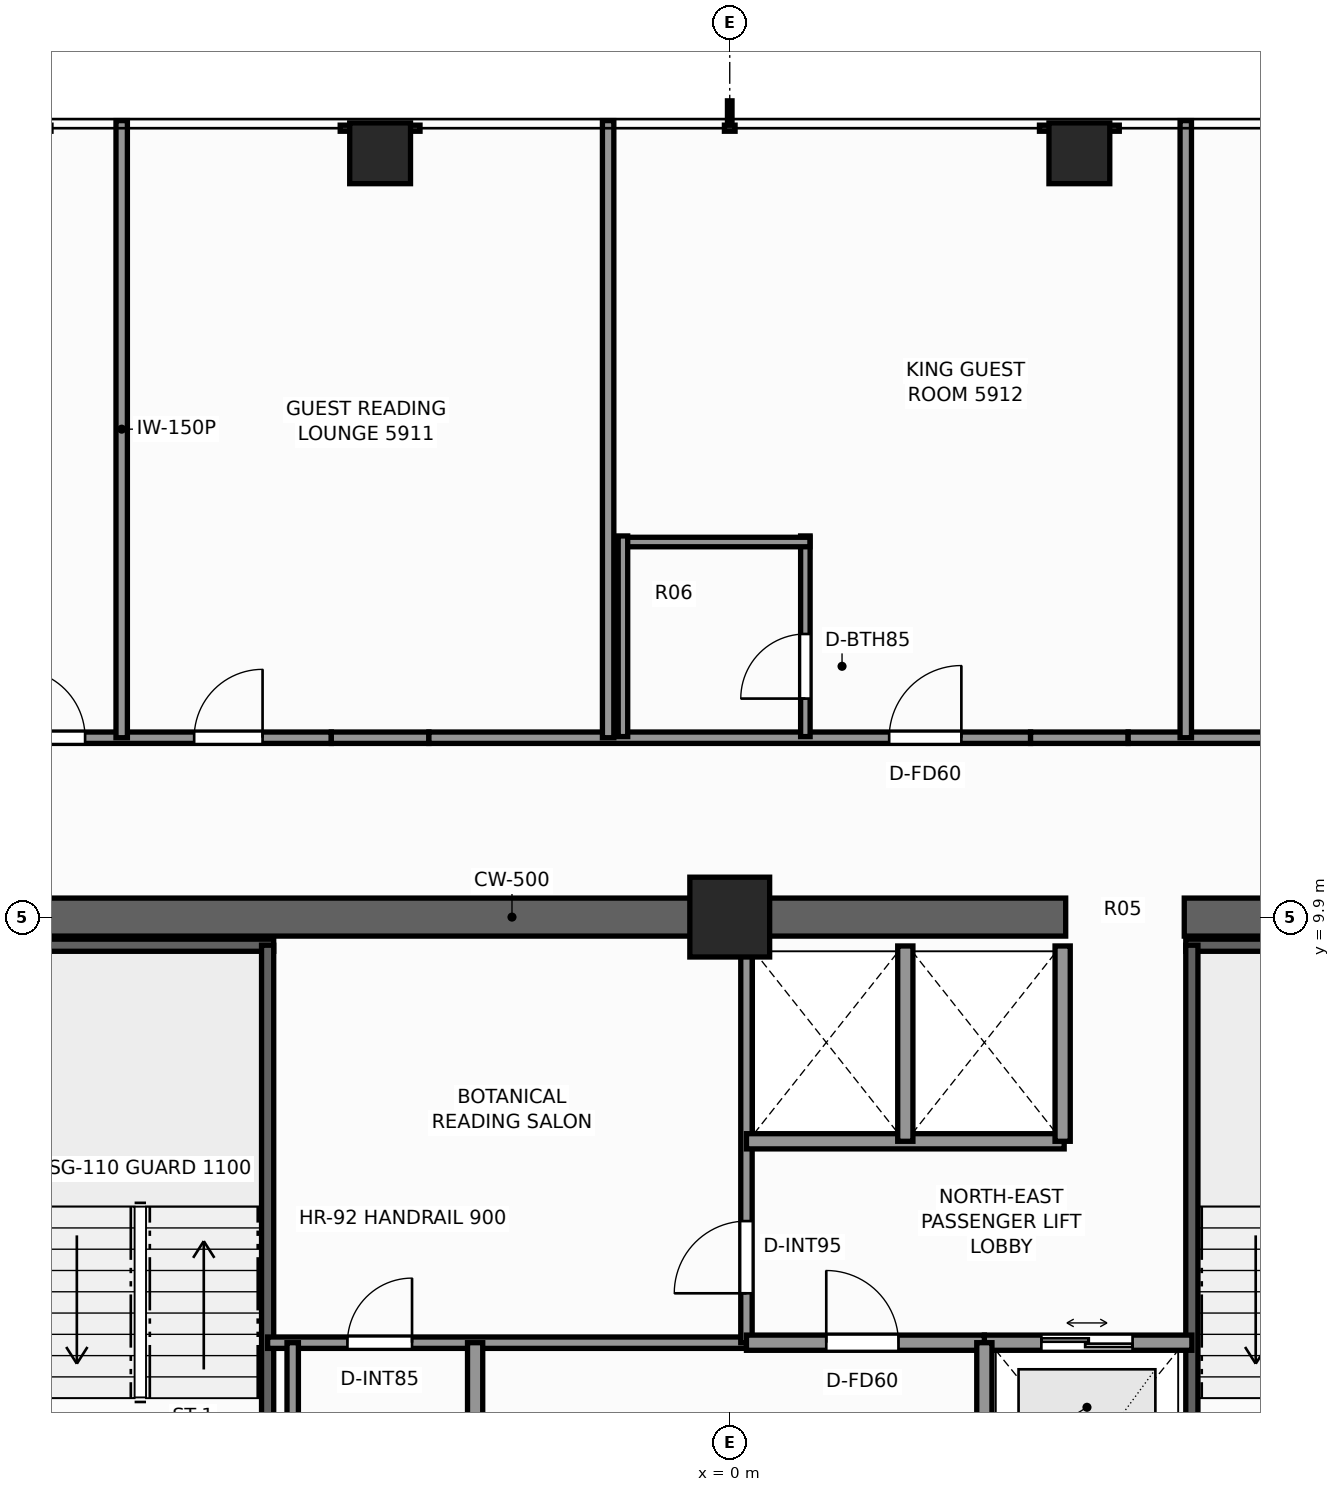
"""IFC4 building model, lengths in metres.
Left out: names, types, materials, properties, quantities, classifications, styles, units other than length and angle.
Written with IfcOpenShell. Run it as: python <this file> out.ifc"""

import sys

from ifc_helpers import new_model, si_unit, direction, frame, frame_2d, origin, origin_2d, place, context, subcontext, project, spatial, rectangle, extrude, element, fill, save


model = new_model("IFC4")
c1 = context("Model", 3, precision=1e-05, world=origin(), true_north=direction((0.0, 1.0)))
c2 = subcontext(c1, "Body", "Model", "MODEL_VIEW")
j1 = project(units=[si_unit("LENGTHUNIT", "METRE"), si_unit("PLANEANGLEUNIT", "RADIAN")], contexts=[c1])
p1 = place(None, origin())
s1 = spatial("IfcSite", under=j1, at=p1, CompositionType="ELEMENT")
p2 = place(p1, origin())
s2 = spatial("IfcBuilding", under=s1, at=p2, CompositionType="ELEMENT")
p3 = place(p2, frame((0.0, 0.0, 203.1)))
s3 = spatial("IfcBuildingStorey", under=s2, at=p3, CompositionType="ELEMENT", Elevation=203.1)
p4 = place(p3, frame((-10.15, 9.9, 0.0), z_axis=(0.0, 0.0, 1.0), x_axis=(1.0, 0.0, 0.0)))
e1 = element("IfcWall", 1, at=p4, inside=s3, PredefinedType="SHEAR", context=c2, shape_type="SweptSolid", body=[
    extrude(rectangle(XDim=14.57, YDim=0.5, at=frame_2d((7.285, 0.0))), origin(), (0.0, 0.0, 1.0), 3.3),
])
p5 = place(p3, frame((5.98, 9.9, 0.0), z_axis=(0.0, 0.0, 1.0), x_axis=(1.0, 0.0, 0.0)))
e2 = element("IfcWall", 2, at=p5, inside=s3, PredefinedType="SHEAR", context=c2, shape_type="SweptSolid", body=[
    extrude(rectangle(XDim=4.17, YDim=0.5, at=frame_2d((2.085, 0.0))), origin(), (0.0, 0.0, 1.0), 3.3),
])
p6 = place(p3, frame((0.0, 9.9, 0.0), z_axis=(0.0, 0.0, 1.0), x_axis=(1.0, 0.0, 0.0)))
e3 = element("IfcColumn", 3, at=p6, inside=s3, PredefinedType="COLUMN", context=c2, shape_type="SweptSolid", body=[
    extrude(rectangle(XDim=1.05, YDim=1.05, at=origin_2d()), origin(), (0.0, 0.0, 1.0), 3.3),
])
for number, where, z_axis, x_axis in (
    (4, (-4.6, 19.95, 0.0), (0.0, 0.0, 1.0), (1.0, 0.0, 0.0)),
    (5, (4.6, 19.95, 0.0), (0.0, 0.0, 1.0), (1.0, 0.0, 0.0)),
):
    element("IfcColumn", number, at=place(p3, frame(where, z_axis=z_axis, x_axis=x_axis)), inside=s3, PredefinedType="COLUMN", context=c2, shape_type="SweptSolid", body=[
        extrude(rectangle(XDim=0.8, YDim=0.8, at=origin_2d()), origin(), (0.0, 0.0, 1.0), 3.3),
    ])
p7 = place(p3, frame((-9.52, 9.53, 0.0), z_axis=(0.0, 0.0, 1.0), x_axis=(1.0, 0.0, 0.0)))
e6 = element("IfcWall", 6, at=p7, inside=s3, PredefinedType="SHEAR", context=c2, shape_type="SweptSolid", body=[
    extrude(rectangle(XDim=3.52, YDim=0.16, at=frame_2d((1.76, 0.0))), origin(), (0.0, 0.0, 1.0), 3.3),
])
p8 = place(p3, frame((-6.08, 1.97, 0.0), z_axis=(0.0, 0.0, 1.0), x_axis=(0.0, 1.0, 0.0)))
e7 = element("IfcWall", 7, at=p8, inside=s3, PredefinedType="SHEAR", context=c2, shape_type="SweptSolid", body=[
    extrude(rectangle(XDim=7.56, YDim=0.16, at=frame_2d((3.78, 0.0))), origin(), (0.0, 0.0, 1.0), 3.3),
])
p9 = place(p3, frame((6.0, 9.53, 0.0), z_axis=(0.0, 0.0, 1.0), x_axis=(1.0, 0.0, 0.0)))
e8 = element("IfcWall", 8, at=p9, inside=s3, PredefinedType="SHEAR", context=c2, shape_type="SweptSolid", body=[
    extrude(rectangle(XDim=3.52, YDim=0.16, at=frame_2d((1.76, 0.0))), origin(), (0.0, 0.0, 1.0), 3.3),
])
p10 = place(p3, frame((6.08, 1.97, 0.0), z_axis=(0.0, 0.0, 1.0), x_axis=(0.0, 1.0, 0.0)))
e9 = element("IfcWall", 9, at=p10, inside=s3, PredefinedType="SHEAR", context=c2, shape_type="SweptSolid", body=[
    extrude(rectangle(XDim=7.56, YDim=0.16, at=frame_2d((3.78, 0.0))), origin(), (0.0, 0.0, 1.0), 3.3),
])
p11 = place(p3, frame((3.35, 4.3, 0.0), z_axis=(0.0, 0.0, 1.0), x_axis=(1.0, 0.0, 0.0)))
e10 = element("IfcWall", 10, at=p11, inside=s3, PredefinedType="SOLIDWALL", context=c2, shape_type="SweptSolid", body=[
    extrude(rectangle(XDim=2.73, YDim=0.2, at=frame_2d((1.365, 0.0))), origin(), (0.0, 0.0, 1.0), 3.08),
])
p12 = place(p11, frame((0.75, 0.0, 0.0)))
e11 = element("IfcOpeningElement", 11, at=p12, cuts=e10, PredefinedType="OPENING", context=c2, shape_type="SweptSolid", body=[
    extrude(rectangle(XDim=1.2, YDim=2.25, at=frame_2d((0.6, 1.125))), frame((0.0, 0.11, 0.0), z_axis=(0.0, -1.0, 0.0), x_axis=(1.0, 0.0, 0.0)), (0.0, 0.0, 1.0), 0.22),
])
p13 = place(p3, frame((-6.08, 4.3, 0.0), z_axis=(0.0, 0.0, 1.0), x_axis=(1.0, 0.0, 0.0)))
e12 = element("IfcWall", 12, at=p13, inside=s3, PredefinedType="PARTITIONING", context=c2, shape_type="SweptSolid", body=[
    extrude(rectangle(XDim=6.3, YDim=0.15, at=frame_2d((3.15, 0.0))), origin(), (0.0, 0.0, 1.0), 3.08),
])
p14 = place(p13, frame((1.05, 0.0, 0.0)))
e13 = element("IfcOpeningElement", 13, at=p14, cuts=e12, PredefinedType="OPENING", context=c2, shape_type="SweptSolid", body=[
    extrude(rectangle(XDim=0.85, YDim=2.03, at=frame_2d((0.425, 1.015))), frame((0.0, 0.085, 0.0), z_axis=(0.0, -1.0, 0.0), x_axis=(1.0, 0.0, 0.0)), (0.0, 0.0, 1.0), 0.17),
])
p15 = place(p3, frame((0.22, 4.3, 0.0), z_axis=(0.0, 0.0, 1.0), x_axis=(0.0, 1.0, 0.0)))
e14 = element("IfcWall", 14, at=p15, inside=s3, PredefinedType="PARTITIONING", context=c2, shape_type="SweptSolid", body=[
    extrude(rectangle(XDim=5.22, YDim=0.15, at=frame_2d((2.61, 0.0))), origin(), (0.0, 0.0, 1.0), 3.08),
])
p16 = place(p15, frame((0.65, 0.0, 0.0)))
e15 = element("IfcOpeningElement", 15, at=p16, cuts=e14, PredefinedType="OPENING", context=c2, shape_type="SweptSolid", body=[
    extrude(rectangle(XDim=0.95, YDim=2.06, at=frame_2d((0.475, 1.03))), frame((0.0, 0.085, 0.0), z_axis=(0.0, -1.0, 0.0), x_axis=(1.0, 0.0, 0.0)), (0.0, 0.0, 1.0), 0.17),
])
p17 = place(p3, frame((0.22, 6.95, 0.0), z_axis=(0.0, 0.0, 1.0), x_axis=(1.0, 0.0, 0.0)))
e16 = element("IfcWall", 16, at=p17, inside=s3, PredefinedType="SOLIDWALL", context=c2, shape_type="SweptSolid", body=[
    extrude(rectangle(XDim=4.18, YDim=0.2, at=frame_2d((2.09, 0.0))), origin(), (0.0, 0.0, 1.0), 3.08),
])
for number, where, z_axis, x_axis in (
    (17, (4.38, 6.95, 0.0), (0.0, 0.0, 1.0), (0.0, 1.0, 0.0)),
    (18, (2.31, 6.95, 0.0), (0.0, 0.0, 1.0), (0.0, 1.0, 0.0)),
):
    element("IfcWall", number, at=place(p3, frame(where, z_axis=z_axis, x_axis=x_axis)), inside=s3, PredefinedType="SOLIDWALL", context=c2, shape_type="SweptSolid", body=[
        extrude(rectangle(XDim=2.57, YDim=0.2, at=frame_2d((1.285, 0.0))), origin(), (0.0, 0.0, 1.0), 3.08),
    ])
p18 = place(p3, frame((0.22, 4.3, 0.0), z_axis=(0.0, 0.0, 1.0), x_axis=(1.0, 0.0, 0.0)))
e19 = element("IfcWall", 19, at=p18, inside=s3, PredefinedType="SOLIDWALL", context=c2, shape_type="SweptSolid", body=[
    extrude(rectangle(XDim=3.13, YDim=0.2, at=frame_2d((1.565, 0.0))), origin(), (0.0, 0.0, 1.0), 3.08),
])
p19 = place(p18, frame((1.05, 0.0, 0.0)))
e20 = element("IfcOpeningElement", 20, at=p19, cuts=e19, PredefinedType="OPENING", context=c2, shape_type="SweptSolid", body=[
    extrude(rectangle(XDim=0.95, YDim=2.06, at=frame_2d((0.475, 1.03))), frame((0.0, 0.11, 0.0), z_axis=(0.0, -1.0, 0.0), x_axis=(1.0, 0.0, 0.0)), (0.0, 0.0, 1.0), 0.22),
])
for number, where, z_axis, x_axis in (
    (21, (-3.35, 1.1, 0.0), (0.0, 0.0, 1.0), (0.0, 1.0, 0.0)),
    (22, (3.35, 1.1, 0.0), (0.0, 0.0, 1.0), (0.0, 1.0, 0.0)),
):
    element("IfcWall", number, at=place(p3, frame(where, z_axis=z_axis, x_axis=x_axis)), inside=s3, PredefinedType="SOLIDWALL", context=c2, shape_type="SweptSolid", body=[
        extrude(rectangle(XDim=3.2, YDim=0.2, at=frame_2d((1.6, 0.0))), origin(), (0.0, 0.0, 1.0), 3.08),
    ])
p20 = place(p3, frame((-5.75, 1.97, 0.0), z_axis=(0.0, 0.0, 1.0), x_axis=(0.0, 1.0, 0.0)))
e23 = element("IfcWall", 23, at=p20, inside=s3, PredefinedType="PARTITIONING", context=c2, shape_type="SweptSolid", body=[
    extrude(rectangle(XDim=2.33, YDim=0.15, at=frame_2d((1.165, 0.0))), origin(), (0.0, 0.0, 1.0), 3.08),
])
p21 = place(p3, frame((-10.014, 12.26, 0.0), z_axis=(0.0, 0.0, 1.0), x_axis=(1.0, 0.0, 0.0)))
e24 = element("IfcWall", 24, at=p21, inside=s3, PredefinedType="PARTITIONING", context=c2, shape_type="SweptSolid", body=[
    extrude(rectangle(XDim=4.772, YDim=0.15, at=frame_2d((2.386, 0.0))), origin(), (0.0, 0.0, 1.0), 3.08),
])
p22 = place(p21, frame((0.632, 0.0, 0.0)))
e25 = element("IfcOpeningElement", 25, at=p22, cuts=e24, PredefinedType="OPENING", context=c2, shape_type="SweptSolid", body=[
    extrude(rectangle(XDim=0.9, YDim=2.06, at=frame_2d((0.45, 1.03))), frame((0.0, 0.085, 0.0), z_axis=(0.0, -1.0, 0.0), x_axis=(1.0, 0.0, 0.0)), (0.0, 0.0, 1.0), 0.17),
])
p23 = place(p21, frame((2.967, 0.0, 0.0)))
e26 = element("IfcOpeningElement", 26, at=p23, cuts=e24, PredefinedType="OPENING", context=c2, shape_type="SweptSolid", body=[
    extrude(rectangle(XDim=0.9, YDim=2.06, at=frame_2d((0.45, 1.03))), frame((0.0, 0.085, 0.0), z_axis=(0.0, -1.0, 0.0), x_axis=(1.0, 0.0, 0.0)), (0.0, 0.0, 1.0), 0.17),
])
p24 = place(p3, frame((-5.242, 12.26, 0.0), z_axis=(0.0, 0.0, 1.0), x_axis=(1.0, 0.0, 0.0)))
e27 = element("IfcWall", 27, at=p24, inside=s3, PredefinedType="PARTITIONING", context=c2, shape_type="SweptSolid", body=[
    extrude(rectangle(XDim=1.284, YDim=0.15, at=frame_2d((0.642, 0.0))), origin(), (0.0, 0.0, 1.0), 1.265),
])
p25 = place(p3, frame((-3.958, 12.26, 0.0), z_axis=(0.0, 0.0, 1.0), x_axis=(1.0, 0.0, 0.0)))
e28 = element("IfcWall", 28, at=p25, inside=s3, PredefinedType="PARTITIONING", context=c2, shape_type="SweptSolid", body=[
    extrude(rectangle(XDim=7.916, YDim=0.15, at=frame_2d((3.958, 0.0))), origin(), (0.0, 0.0, 1.0), 2.369),
])
p26 = place(p25, frame((6.055, 0.0, 0.0)))
e29 = element("IfcOpeningElement", 29, at=p26, cuts=e28, PredefinedType="OPENING", context=c2, shape_type="SweptSolid", body=[
    extrude(rectangle(XDim=0.95, YDim=2.06, at=frame_2d((0.475, 1.03))), frame((0.0, 0.085, 0.0), z_axis=(0.0, -1.0, 0.0), x_axis=(1.0, 0.0, 0.0)), (0.0, 0.0, 1.0), 0.17),
])
p27 = place(p3, frame((3.958, 12.26, 0.0), z_axis=(0.0, 0.0, 1.0), x_axis=(1.0, 0.0, 0.0)))
e30 = element("IfcWall", 30, at=p27, inside=s3, PredefinedType="PARTITIONING", context=c2, shape_type="SweptSolid", body=[
    extrude(rectangle(XDim=1.284, YDim=0.15, at=frame_2d((0.642, 0.0))), origin(), (0.0, 0.0, 1.0), 1.265),
])
p28 = place(p3, frame((5.242, 12.26, 0.0), z_axis=(0.0, 0.0, 1.0), x_axis=(1.0, 0.0, 0.0)))
e31 = element("IfcWall", 31, at=p28, inside=s3, PredefinedType="PARTITIONING", context=c2, shape_type="SweptSolid", body=[
    extrude(rectangle(XDim=4.772, YDim=0.15, at=frame_2d((2.386, 0.0))), origin(), (0.0, 0.0, 1.0), 3.08),
])
p29 = place(p28, frame((2.278, 0.0, 0.0)))
e32 = element("IfcOpeningElement", 32, at=p29, cuts=e31, PredefinedType="OPENING", context=c2, shape_type="SweptSolid", body=[
    extrude(rectangle(XDim=0.9, YDim=2.06, at=frame_2d((0.45, 1.03))), frame((0.0, 0.085, 0.0), z_axis=(0.0, -1.0, 0.0), x_axis=(1.0, 0.0, 0.0)), (0.0, 0.0, 1.0), 0.17),
])
for number, where, z_axis, x_axis in (
    (33, (-8.0, 12.26, 0.0), (0.0, 0.0, 1.0), (0.0, 1.0, 0.0)),
    (34, (-1.6, 12.26, 0.0), (0.0, 0.0, 1.0), (0.0, 1.0, 0.0)),
    (35, (6.0, 12.26, 0.0), (0.0, 0.0, 1.0), (0.0, 1.0, 0.0)),
):
    element("IfcWall", number, at=place(p3, frame(where, z_axis=z_axis, x_axis=x_axis)), inside=s3, PredefinedType="PARTITIONING", context=c2, shape_type="SweptSolid", body=[
        extrude(rectangle(XDim=8.12, YDim=0.15, at=frame_2d((4.06, 0.0))), origin(), (0.0, 0.0, 1.0), 2.453),
    ])
p30 = place(p3, frame((0.995, 12.275, 0.0), z_axis=(0.0, 0.0, 1.0), x_axis=(0.0, 1.0, 0.0)))
e36 = element("IfcWall", 36, at=p30, inside=s3, PredefinedType="PARTITIONING", context=c2, shape_type="SweptSolid", body=[
    extrude(rectangle(XDim=2.64, YDim=0.125, at=frame_2d((1.32, 0.0))), origin(), (0.0, 0.0, 1.0), 3.08),
])
p31 = place(p30, frame((0.5, 0.0, 0.0)))
e37 = element("IfcOpeningElement", 37, at=p31, cuts=e36, PredefinedType="OPENING", context=c2, shape_type="SweptSolid", body=[
    extrude(rectangle(XDim=0.85, YDim=2.03, at=frame_2d((0.425, 1.015))), frame((0.0, 0.073, 0.0), z_axis=(0.0, -1.0, 0.0), x_axis=(1.0, 0.0, 0.0)), (0.0, 0.0, 1.0), 0.145),
])
p32 = place(p3, frame((-1.465, 14.835, 0.0), z_axis=(0.0, 0.0, 1.0), x_axis=(1.0, 0.0, 0.0)))
e38 = element("IfcWall", 38, at=p32, inside=s3, PredefinedType="PARTITIONING", context=c2, shape_type="SweptSolid", body=[
    extrude(rectangle(XDim=2.52, YDim=0.125, at=frame_2d((1.26, 0.0))), origin(), (0.0, 0.0, 1.0), 2.605),
])
p33 = place(p3, frame((-1.405, 12.275, 0.0), z_axis=(0.0, 0.0, 1.0), x_axis=(0.0, 1.0, 0.0)))
e39 = element("IfcWall", 39, at=p33, inside=s3, PredefinedType="PARTITIONING", context=c2, shape_type="SweptSolid", body=[
    extrude(rectangle(XDim=2.64, YDim=0.125, at=frame_2d((1.32, 0.0))), origin(), (0.0, 0.0, 1.0), 3.08),
])
p34 = place(p12, origin())
e40 = element("IfcDoor", 40, at=p34, inside=s3, OperationType="DOUBLE_DOOR_SLIDING", PredefinedType="DOOR", context=c2, shape_type="SweptSolid", body=[
    extrude(rectangle(XDim=1.2, YDim=2.25, at=frame_2d((0.6, 1.125))), frame((0.0, 0.025, 0.0), z_axis=(0.0, -1.0, 0.0), x_axis=(1.0, 0.0, 0.0)), (0.0, 0.0, 1.0), 0.05),
])
fill(e11, e40)
p35 = place(p16, origin())
e41 = element("IfcDoor", 41, at=p35, inside=s3, OperationType="SINGLE_SWING_LEFT", PredefinedType="DOOR", context=c2, shape_type="SweptSolid", body=[
    extrude(rectangle(XDim=0.95, YDim=2.06, at=frame_2d((0.475, 1.03))), frame((0.0, 0.025, 0.0), z_axis=(0.0, -1.0, 0.0), x_axis=(1.0, 0.0, 0.0)), (0.0, 0.0, 1.0), 0.05),
])
fill(e15, e41)
p36 = place(p19, origin())
e42 = element("IfcDoor", 42, at=p36, inside=s3, OperationType="SINGLE_SWING_LEFT", PredefinedType="DOOR", context=c2, shape_type="SweptSolid", body=[
    extrude(rectangle(XDim=0.95, YDim=2.06, at=frame_2d((0.475, 1.03))), frame((0.0, 0.025, 0.0), z_axis=(0.0, -1.0, 0.0), x_axis=(1.0, 0.0, 0.0)), (0.0, 0.0, 1.0), 0.05),
])
fill(e20, e42)
p37 = place(p14, origin())
e43 = element("IfcDoor", 43, at=p37, inside=s3, OperationType="SINGLE_SWING_RIGHT", PredefinedType="DOOR", context=c2, shape_type="SweptSolid", body=[
    extrude(rectangle(XDim=0.85, YDim=2.03, at=frame_2d((0.425, 1.015))), frame((0.0, 0.025, 0.0), z_axis=(0.0, -1.0, 0.0), x_axis=(1.0, 0.0, 0.0)), (0.0, 0.0, 1.0), 0.05),
])
fill(e13, e43)
p38 = place(p22, origin())
e44 = element("IfcDoor", 44, at=p38, inside=s3, OperationType="SINGLE_SWING_LEFT", PredefinedType="DOOR", context=c2, shape_type="SweptSolid", body=[
    extrude(rectangle(XDim=0.9, YDim=2.06, at=frame_2d((0.45, 1.03))), frame((0.0, 0.025, 0.0), z_axis=(0.0, -1.0, 0.0), x_axis=(1.0, 0.0, 0.0)), (0.0, 0.0, 1.0), 0.05),
])
fill(e25, e44)
p39 = place(p23, origin())
e45 = element("IfcDoor", 45, at=p39, inside=s3, OperationType="SINGLE_SWING_RIGHT", PredefinedType="DOOR", context=c2, shape_type="SweptSolid", body=[
    extrude(rectangle(XDim=0.9, YDim=2.06, at=frame_2d((0.45, 1.03))), frame((0.0, 0.025, 0.0), z_axis=(0.0, -1.0, 0.0), x_axis=(1.0, 0.0, 0.0)), (0.0, 0.0, 1.0), 0.05),
])
fill(e26, e45)
p40 = place(p31, origin())
e46 = element("IfcDoor", 46, at=p40, inside=s3, OperationType="SINGLE_SWING_LEFT", PredefinedType="DOOR", context=c2, shape_type="SweptSolid", body=[
    extrude(rectangle(XDim=0.85, YDim=2.03, at=frame_2d((0.425, 1.015))), frame((0.0, 0.025, 0.0), z_axis=(0.0, -1.0, 0.0), x_axis=(1.0, 0.0, 0.0)), (0.0, 0.0, 1.0), 0.05),
])
fill(e37, e46)
p41 = place(p26, origin())
e47 = element("IfcDoor", 47, at=p41, inside=s3, OperationType="SINGLE_SWING_RIGHT", PredefinedType="DOOR", context=c2, shape_type="SweptSolid", body=[
    extrude(rectangle(XDim=0.95, YDim=2.06, at=frame_2d((0.475, 1.03))), frame((0.0, 0.025, 0.0), z_axis=(0.0, -1.0, 0.0), x_axis=(1.0, 0.0, 0.0)), (0.0, 0.0, 1.0), 0.05),
])
fill(e29, e47)
save(model, sys.argv[1])
